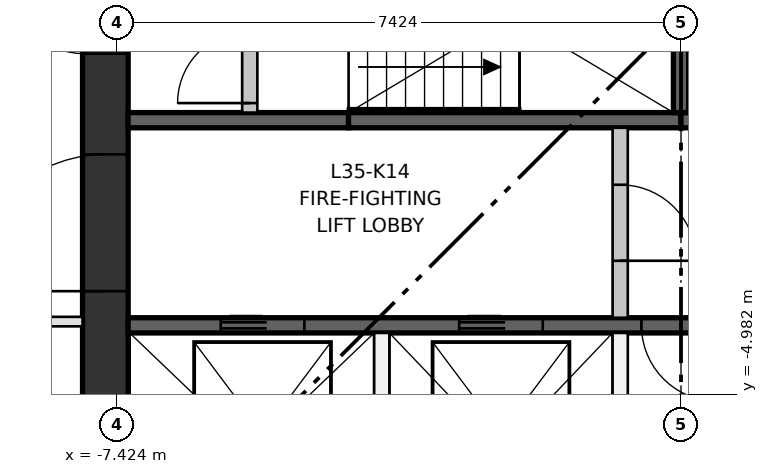
"""IFC4 building model, lengths in metres.
Left out: names, types, materials, properties, quantities, classifications, styles, units other than length and angle.
Written with IfcOpenShell. Run it as: python <this file> out.ifc"""

import sys

from ifc_helpers import new_model, si_unit, direction, frame, frame_2d, origin, place, context, subcontext, project, spatial, rectangle, extrude, element, fill, save


model = new_model("IFC4")
c1 = context("Model", 3, precision=1e-05, world=origin(), true_north=direction((0.0, 1.0)))
c2 = subcontext(c1, "Body", "Model", "MODEL_VIEW")
j1 = project(units=[si_unit("LENGTHUNIT", "METRE"), si_unit("PLANEANGLEUNIT", "RADIAN")], contexts=[c1])
p1 = place(None, origin())
s1 = spatial("IfcSite", under=j1, at=p1, CompositionType="ELEMENT")
p2 = place(p1, origin())
s2 = spatial("IfcBuilding", under=s1, at=p2, CompositionType="ELEMENT")
p3 = place(p2, frame((0.0, 0.0, 134.35)))
s3 = spatial("IfcBuildingStorey", under=s2, at=p3, CompositionType="ELEMENT", Elevation=134.35)
p4 = place(p3, frame((-7.574, -7.274, 0.0), z_axis=(0.0, 0.0, 1.0), x_axis=(0.0, 1.0, 0.0)))
e1 = element("IfcWall", 1, at=p4, inside=s3, PredefinedType="SHEAR", context=c2, shape_type="SweptSolid", body=[
    extrude(rectangle(XDim=14.548, YDim=0.6, at=frame_2d((7.274, 0.0))), origin(), (0.0, 0.0, 1.0), 3.35),
])
p5 = place(p4, frame((6.774, 0.0, 0.0)))
e2 = element("IfcOpeningElement", 2, at=p5, cuts=e1, PredefinedType="OPENING", context=c2, shape_type="SweptSolid", body=[
    extrude(rectangle(XDim=1.0, YDim=2.1, at=frame_2d((0.5, 1.05))), frame((0.0, 0.31, 0.0), z_axis=(0.0, -1.0, 0.0), x_axis=(1.0, 0.0, 0.0)), (0.0, 0.0, 1.0), 0.62),
])
p6 = place(p4, frame((3.649, 0.0, 0.0)))
e3 = element("IfcOpeningElement", 3, at=p6, cuts=e1, PredefinedType="OPENING", context=c2, shape_type="SweptSolid", body=[
    extrude(rectangle(XDim=1.8, YDim=2.1, at=frame_2d((0.9, 1.05))), frame((0.0, 0.31, 0.0), z_axis=(0.0, -1.0, 0.0), x_axis=(1.0, 0.0, 0.0)), (0.0, 0.0, 1.0), 0.62),
])
p7 = place(p4, frame((9.098, 0.0, 0.0)))
e4 = element("IfcOpeningElement", 4, at=p7, cuts=e1, PredefinedType="OPENING", context=c2, shape_type="SweptSolid", body=[
    extrude(rectangle(XDim=1.8, YDim=2.1, at=frame_2d((0.9, 1.05))), frame((0.0, 0.31, 0.0), z_axis=(0.0, -1.0, 0.0), x_axis=(1.0, 0.0, 0.0)), (0.0, 0.0, 1.0), 0.62),
])
p8 = place(p3, frame((-7.274, -4.074, 0.0), z_axis=(0.0, 0.0, 1.0), x_axis=(1.0, 0.0, 0.0)))
e5 = element("IfcWall", 5, at=p8, inside=s3, PredefinedType="SHEAR", context=c2, shape_type="SweptSolid", body=[
    extrude(rectangle(XDim=14.548, YDim=0.2, at=frame_2d((7.274, 0.0))), origin(), (0.0, 0.0, 1.0), 3.0),
])
p9 = place(p8, frame((1.219, 0.0, 0.0)))
e6 = element("IfcOpeningElement", 6, at=p9, cuts=e5, PredefinedType="OPENING", context=c2, shape_type="SweptSolid", body=[
    extrude(rectangle(XDim=1.1, YDim=2.1, at=frame_2d((0.55, 1.05))), frame((0.0, 0.11, 0.0), z_axis=(0.0, -1.0, 0.0), x_axis=(1.0, 0.0, 0.0)), (0.0, 0.0, 1.0), 0.22),
])
p10 = place(p8, frame((4.355, 0.0, 0.0)))
e7 = element("IfcOpeningElement", 7, at=p10, cuts=e5, PredefinedType="OPENING", context=c2, shape_type="SweptSolid", body=[
    extrude(rectangle(XDim=1.1, YDim=2.1, at=frame_2d((0.55, 1.05))), frame((0.0, 0.11, 0.0), z_axis=(0.0, -1.0, 0.0), x_axis=(1.0, 0.0, 0.0)), (0.0, 0.0, 1.0), 0.22),
])
p11 = place(p8, frame((6.753, 0.0, 0.0)))
e8 = element("IfcOpeningElement", 8, at=p11, cuts=e5, PredefinedType="OPENING", context=c2, shape_type="SweptSolid", body=[
    extrude(rectangle(XDim=1.0, YDim=2.1, at=frame_2d((0.5, 1.05))), frame((0.0, 0.11, 0.0), z_axis=(0.0, -1.0, 0.0), x_axis=(1.0, 0.0, 0.0)), (0.0, 0.0, 1.0), 0.22),
])
p12 = place(p8, frame((8.312, 0.0, 0.0)))
e9 = element("IfcOpeningElement", 9, at=p12, cuts=e5, PredefinedType="OPENING", context=c2, shape_type="SweptSolid", body=[
    extrude(rectangle(XDim=1.0, YDim=2.1, at=frame_2d((0.5, 1.05))), frame((0.0, 0.11, 0.0), z_axis=(0.0, -1.0, 0.0), x_axis=(1.0, 0.0, 0.0)), (0.0, 0.0, 1.0), 0.22),
])
p13 = place(p8, frame((10.358, 0.0, 0.0)))
e10 = element("IfcOpeningElement", 10, at=p13, cuts=e5, PredefinedType="OPENING", context=c2, shape_type="SweptSolid", body=[
    extrude(rectangle(XDim=0.8, YDim=2.1, at=frame_2d((0.4, 1.05))), frame((0.0, 0.11, 0.0), z_axis=(0.0, -1.0, 0.0), x_axis=(1.0, 0.0, 0.0)), (0.0, 0.0, 1.0), 0.22),
])
p14 = place(p8, frame((12.787, 0.0, 0.0)))
e11 = element("IfcOpeningElement", 11, at=p14, cuts=e5, PredefinedType="OPENING", context=c2, shape_type="SweptSolid", body=[
    extrude(rectangle(XDim=1.0, YDim=2.1, at=frame_2d((0.5, 1.05))), frame((0.0, 0.11, 0.0), z_axis=(0.0, -1.0, 0.0), x_axis=(1.0, 0.0, 0.0)), (0.0, 0.0, 1.0), 0.22),
])
p15 = place(p3, frame((-7.274, -1.375, 0.0), z_axis=(0.0, 0.0, 1.0), x_axis=(1.0, 0.0, 0.0)))
e12 = element("IfcWall", 12, at=p15, inside=s3, PredefinedType="SHEAR", context=c2, shape_type="SweptSolid", body=[
    extrude(rectangle(XDim=2.9, YDim=0.2, at=frame_2d((1.45, 0.0))), origin(), (0.0, 0.0, 1.0), 3.0),
])
for number, where, z_axis, x_axis in (
    (13, (-4.374, -1.375, 0.0), (0.0, 0.0, 1.0), (1.0, 0.0, 0.0)),
    (14, (0.0, -1.375, 0.0), (0.0, 0.0, 1.0), (1.0, 0.0, 0.0)),
):
    element("IfcWall", number, at=place(p3, frame(where, z_axis=z_axis, x_axis=x_axis)), inside=s3, PredefinedType="SHEAR", context=c2, shape_type="SweptSolid", body=[
        extrude(rectangle(XDim=4.374, YDim=0.2, at=frame_2d((2.187, 0.0))), origin(), (0.0, 0.0, 1.0), 3.0),
    ])
p16 = place(p3, frame((0.0, -1.275, 0.0), z_axis=(0.0, 0.0, 1.0), x_axis=(0.0, 1.0, 0.0)))
e15 = element("IfcWall", 15, at=p16, inside=s3, PredefinedType="SHEAR", context=c2, shape_type="SweptSolid", body=[
    extrude(rectangle(XDim=2.55, YDim=0.2, at=frame_2d((1.275, 0.0))), origin(), (0.0, 0.0, 1.0), 3.0),
])
for number, where, z_axis, x_axis in (
    (16, (-3.937, -7.274, 0.0), (0.0, 0.0, 1.0), (0.0, 1.0, 0.0)),
    (17, (-0.8, -7.274, 0.0), (0.0, 0.0, 1.0), (0.0, 1.0, 0.0)),
):
    element("IfcWall", number, at=place(p3, frame(where, z_axis=z_axis, x_axis=x_axis)), inside=s3, PredefinedType="PARTITIONING", context=c2, shape_type="SweptSolid", body=[
        extrude(rectangle(XDim=3.1, YDim=0.2, at=frame_2d((1.55, 0.0))), origin(), (0.0, 0.0, 1.0), 3.0),
    ])
p17 = place(p3, frame((-0.8, -3.974, 0.0), z_axis=(0.0, 0.0, 1.0), x_axis=(0.0, 1.0, 0.0)))
e18 = element("IfcWall", 18, at=p17, inside=s3, PredefinedType="PARTITIONING", context=c2, shape_type="SweptSolid", body=[
    extrude(rectangle(XDim=2.499, YDim=0.2, at=frame_2d((1.25, 0.0))), origin(), (0.0, 0.0, 1.0), 3.0),
])
p18 = place(p17, frame((0.75, 0.0, 0.0)))
e19 = element("IfcOpeningElement", 19, at=p18, cuts=e18, PredefinedType="OPENING", context=c2, shape_type="SweptSolid", body=[
    extrude(rectangle(XDim=1.0, YDim=2.1, at=frame_2d((0.5, 1.05))), frame((0.0, 0.11, 0.0), z_axis=(0.0, -1.0, 0.0), x_axis=(1.0, 0.0, 0.0)), (0.0, 0.0, 1.0), 0.22),
])
p19 = place(p3, frame((-5.674, -1.275, 0.0), z_axis=(0.0, 0.0, 1.0), x_axis=(0.0, 1.0, 0.0)))
e20 = element("IfcWall", 20, at=p19, inside=s3, PredefinedType="PARTITIONING", context=c2, shape_type="SweptSolid", body=[
    extrude(rectangle(XDim=2.55, YDim=0.2, at=frame_2d((1.275, 0.0))), origin(), (0.0, 0.0, 1.0), 3.0),
])
p20 = place(p19, frame((0.125, 0.0, 0.0)))
e21 = element("IfcOpeningElement", 21, at=p20, cuts=e20, PredefinedType="OPENING", context=c2, shape_type="SweptSolid", body=[
    extrude(rectangle(XDim=0.95, YDim=2.1, at=frame_2d((0.475, 1.05))), frame((0.0, 0.11, 0.0), z_axis=(0.0, -1.0, 0.0), x_axis=(1.0, 0.0, 0.0)), (0.0, 0.0, 1.0), 0.22),
])
p21 = place(p19, frame((1.475, 0.0, 0.0)))
e22 = element("IfcOpeningElement", 22, at=p21, cuts=e20, PredefinedType="OPENING", context=c2, shape_type="SweptSolid", body=[
    extrude(rectangle(XDim=0.95, YDim=2.1, at=frame_2d((0.475, 1.05))), frame((0.0, 0.11, 0.0), z_axis=(0.0, -1.0, 0.0), x_axis=(1.0, 0.0, 0.0)), (0.0, 0.0, 1.0), 0.22),
])
p22 = place(p3, frame((-7.874, -4.024, 0.0), z_axis=(0.0, 0.0, 1.0), x_axis=(-1.0, 0.0, 0.0)))
e23 = element("IfcWall", 23, at=p22, inside=s3, PredefinedType="PARTITIONING", context=c2, shape_type="SweptSolid", body=[
    extrude(rectangle(XDim=6.458, YDim=0.125, at=frame_2d((3.229, 0.0))), origin(), (0.0, 0.0, 1.0), 3.0),
])
p23 = place(p22, frame((2.7, 0.0, 0.0)))
e24 = element("IfcOpeningElement", 24, at=p23, cuts=e23, PredefinedType="OPENING", context=c2, shape_type="SweptSolid", body=[
    extrude(rectangle(XDim=1.0, YDim=2.1, at=frame_2d((0.5, 1.05))), frame((0.0, 0.073, 0.0), z_axis=(0.0, -1.0, 0.0), x_axis=(1.0, 0.0, 0.0)), (0.0, 0.0, 1.0), 0.145),
])
p24 = place(p9, origin())
e25 = element("IfcDoor", 25, at=p24, inside=s3, OperationType="DOUBLE_DOOR_SLIDING", PredefinedType="DOOR", context=c2, shape_type="SweptSolid", body=[
    extrude(rectangle(XDim=1.1, YDim=2.1, at=frame_2d((0.55, 1.05))), frame((0.0, 0.025, 0.0), z_axis=(0.0, -1.0, 0.0), x_axis=(1.0, 0.0, 0.0)), (0.0, 0.0, 1.0), 0.05),
])
fill(e6, e25)
p25 = place(p10, origin())
e26 = element("IfcDoor", 26, at=p25, inside=s3, OperationType="DOUBLE_DOOR_SLIDING", PredefinedType="DOOR", context=c2, shape_type="SweptSolid", body=[
    extrude(rectangle(XDim=1.1, YDim=2.1, at=frame_2d((0.55, 1.05))), frame((0.0, 0.025, 0.0), z_axis=(0.0, -1.0, 0.0), x_axis=(1.0, 0.0, 0.0)), (0.0, 0.0, 1.0), 0.05),
])
fill(e7, e26)
p26 = place(p20, origin())
e27 = element("IfcDoor", 27, at=p26, inside=s3, OperationType="SINGLE_SWING_LEFT", PredefinedType="DOOR", context=c2, shape_type="SweptSolid", body=[
    extrude(rectangle(XDim=0.95, YDim=2.1, at=frame_2d((0.475, 1.05))), frame((0.0, 0.025, 0.0), z_axis=(0.0, -1.0, 0.0), x_axis=(1.0, 0.0, 0.0)), (0.0, 0.0, 1.0), 0.05),
])
fill(e21, e27)
p27 = place(p18, frame((1.0, 0.0, 0.0), z_axis=(0.0, 0.0, 1.0), x_axis=(-1.0, 0.0, 0.0)))
e28 = element("IfcDoor", 28, at=p27, inside=s3, OperationType="SINGLE_SWING_LEFT", PredefinedType="DOOR", context=c2, shape_type="SweptSolid", body=[
    extrude(rectangle(XDim=1.0, YDim=2.1, at=frame_2d((0.5, 1.05))), frame((0.0, 0.025, 0.0), z_axis=(0.0, -1.0, 0.0), x_axis=(1.0, 0.0, 0.0)), (0.0, 0.0, 1.0), 0.05),
])
fill(e19, e28)
p28 = place(p11, frame((1.0, 0.0, 0.0), z_axis=(0.0, 0.0, 1.0), x_axis=(-1.0, 0.0, 0.0)))
e29 = element("IfcDoor", 29, at=p28, inside=s3, OperationType="SINGLE_SWING_RIGHT", PredefinedType="DOOR", context=c2, shape_type="SweptSolid", body=[
    extrude(rectangle(XDim=1.0, YDim=2.1, at=frame_2d((0.5, 1.05))), frame((0.0, 0.025, 0.0), z_axis=(0.0, -1.0, 0.0), x_axis=(1.0, 0.0, 0.0)), (0.0, 0.0, 1.0), 0.05),
])
fill(e8, e29)
p29 = place(p5, origin())
e30 = element("IfcDoor", 30, at=p29, inside=s3, OperationType="SINGLE_SWING_RIGHT", PredefinedType="DOOR", context=c2, shape_type="SweptSolid", body=[
    extrude(rectangle(XDim=1.0, YDim=2.1, at=frame_2d((0.5, 1.05))), frame((0.0, 0.3, 0.0), z_axis=(0.0, -1.0, 0.0), x_axis=(1.0, 0.0, 0.0)), (0.0, 0.0, 1.0), 0.05),
])
fill(e2, e30)
p30 = place(p6, origin())
e31 = element("IfcDoor", 31, at=p30, inside=s3, OperationType="DOUBLE_DOOR_SINGLE_SWING", PredefinedType="DOOR", context=c2, shape_type="SweptSolid", body=[
    extrude(rectangle(XDim=1.8, YDim=2.1, at=frame_2d((0.9, 1.05))), frame((0.0, 0.025, 0.0), z_axis=(0.0, -1.0, 0.0), x_axis=(1.0, 0.0, 0.0)), (0.0, 0.0, 1.0), 0.05),
])
fill(e3, e31)
save(model, sys.argv[1])
